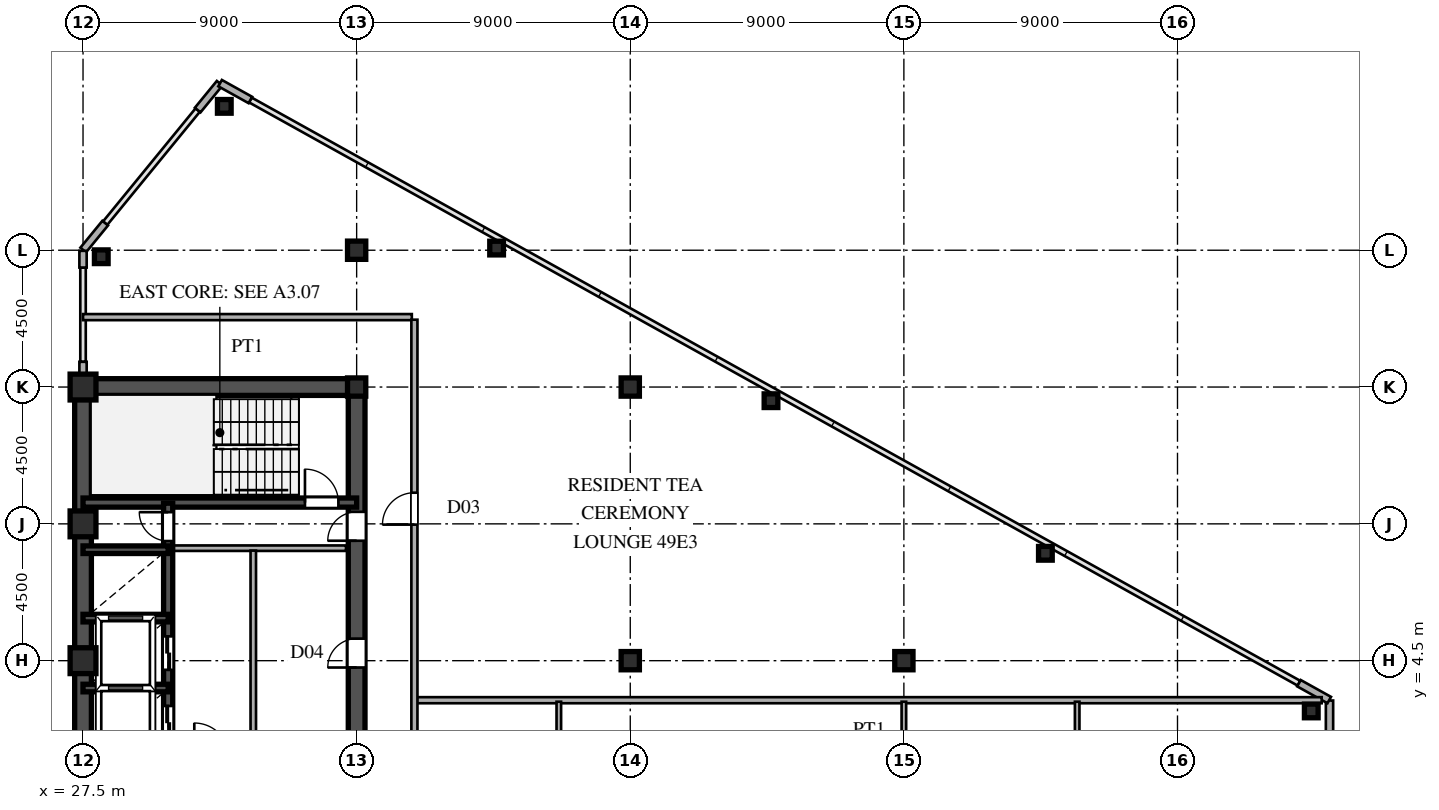
"""IFC4 building model, lengths in metres.
Left out: names, types, materials, properties, quantities, classifications, styles, units other than length and angle.
Written with IfcOpenShell. Run it as: python <this file> out.ifc"""

import sys

from ifc_helpers import new_model, si_unit, direction, frame, frame_2d, origin, origin_2d, place, context, subcontext, project, spatial, rectangle, hollow_rectangle, i_section, extrude, source, transform, mapped, element, fill, save


model = new_model("IFC4")
c1 = context("Model", 3, precision=1e-05, world=origin(), true_north=direction((0.0, 1.0)))
c2 = subcontext(c1, "Body", "Model", "MODEL_VIEW")
j1 = project(units=[si_unit("LENGTHUNIT", "METRE"), si_unit("PLANEANGLEUNIT", "RADIAN")], contexts=[c1])
p1 = place(None, origin())
s1 = spatial("IfcSite", under=j1, at=p1, CompositionType="ELEMENT")
p2 = place(p1, origin())
s2 = spatial("IfcBuilding", under=s1, at=p2, CompositionType="ELEMENT")
p3 = place(p2, frame((0.0, 0.0, 185.1)))
s3 = spatial("IfcBuildingStorey", under=s2, at=p3, CompositionType="ELEMENT", Elevation=185.1)
m1 = source(origin(), c2, "Body", "SweptSolid", [
    extrude(hollow_rectangle(XDim=0.85, YDim=0.85, WallThickness=0.036, at=origin_2d()), origin(), (0.0, 0.0, 1.0), 3.6),
])
for number, where, z_axis, x_axis in (
    (1, (27.5, 4.5, 0.0), (0.0, 0.0, 1.0), (1.0, 0.0, 0.0)),
    (2, (27.5, 9.0, 0.0), (0.0, 0.0, 1.0), (1.0, 0.0, 0.0)),
    (3, (27.5, 13.5, 0.0), (0.0, 0.0, 1.0), (1.0, 0.0, 0.0)),
):
    element("IfcColumn", number, at=place(p3, frame(where, z_axis=z_axis, x_axis=x_axis)), inside=s3, PredefinedType="COLUMN", context=c2, shape_type="MappedRepresentation", body=[
        mapped(m1, transform((0.0, 0.0, 0.0), scale=1.0)),
    ])
m2 = source(origin(), c2, "Body", "SweptSolid", [
    extrude(i_section(OverallWidth=0.6, OverallDepth=0.6, WebThickness=0.025, FlangeThickness=0.04, at=origin_2d()), origin(), (0.0, 0.0, 1.0), 3.6),
])
for number, where, z_axis, x_axis in (
    (4, (36.5, 13.5, 0.0), (0.0, 0.0, 1.0), (1.0, 0.0, 0.0)),
    (5, (36.5, 18.0, 0.0), (0.0, 0.0, 1.0), (1.0, 0.0, 0.0)),
    (6, (45.5, 4.5, 0.0), (0.0, 0.0, 1.0), (1.0, 0.0, 0.0)),
    (7, (45.5, 13.5, 0.0), (0.0, 0.0, 1.0), (1.0, 0.0, 0.0)),
    (8, (54.5, 4.5, 0.0), (0.0, 0.0, 1.0), (1.0, 0.0, 0.0)),
):
    element("IfcColumn", number, at=place(p3, frame(where, z_axis=z_axis, x_axis=x_axis)), inside=s3, PredefinedType="COLUMN", context=c2, shape_type="MappedRepresentation", body=[
        mapped(m2, transform((0.0, 0.0, 0.0), scale=1.0)),
    ])
m3 = source(origin(), c2, "Body", "SweptSolid", [
    extrude(hollow_rectangle(XDim=0.45, YDim=0.45, WallThickness=0.018, at=origin_2d()), origin(), (0.0, 0.0, 1.0), 3.6),
])
for number, where, z_axis, x_axis in (
    (9, (67.9, 2.847, 0.0), (0.0, 0.0, 1.0), (1.0, 0.0, 0.0)),
    (10, (32.147, 22.732, 0.0), (0.0, 0.0, 1.0), (1.0, 0.0, 0.0)),
    (11, (28.1, 17.786, 0.0), (0.0, 0.0, 1.0), (1.0, 0.0, 0.0)),
    (12, (41.104, 18.071, 0.0), (0.0, 0.0, 1.0), (1.0, 0.0, 0.0)),
    (13, (50.129, 13.051, 0.0), (0.0, 0.0, 1.0), (1.0, 0.0, 0.0)),
    (14, (59.155, 8.031, 0.0), (0.0, 0.0, 1.0), (1.0, 0.0, 0.0)),
):
    element("IfcColumn", number, at=place(p3, frame(where, z_axis=z_axis, x_axis=x_axis)), inside=s3, PredefinedType="COLUMN", context=c2, shape_type="MappedRepresentation", body=[
        mapped(m3, transform((0.0, 0.0, 0.0), scale=1.0)),
    ])
for number, where, z_axis, x_axis in (
    (15, (68.5, 2.05, 0.0), (0.0, 0.0, 1.0), (0.0, 1.0, 0.0)),
    (16, (68.491, 3.205, 0.0), (0.0, 0.0, 1.0), (-0.874, 0.486, 0.0)),
    (17, (33.005, 22.941, 0.0), (0.0, 0.0, 1.0), (-0.874, 0.486, 0.0)),
):
    element("IfcWall", number, at=place(p3, frame(where, z_axis=z_axis, x_axis=x_axis)), inside=s3, PredefinedType="SOLIDWALL", context=c2, shape_type="SweptSolid", body=[
        extrude(rectangle(XDim=1.14, YDim=0.24, at=frame_2d((0.57, 0.0))), origin(), (0.0, 0.0, 1.0), 3.38),
    ])
for number, where, z_axis, x_axis in (
    (18, (31.994, 23.492, 0.0), (0.0, 0.0, 1.0), (-0.633, -0.774, 0.0)),
    (19, (28.228, 18.89, 0.0), (0.0, 0.0, 1.0), (-0.633, -0.774, 0.0)),
):
    element("IfcWall", number, at=place(p3, frame(where, z_axis=z_axis, x_axis=x_axis)), inside=s3, PredefinedType="SOLIDWALL", context=c2, shape_type="SweptSolid", body=[
        extrude(rectangle(XDim=1.14, YDim=0.24, at=frame_2d((0.57, 0.0))), origin(), (0.0, 0.0, 1.0), 3.38),
    ])
p4 = place(p3, frame((27.5, 13.78, 0.0), z_axis=(0.0, 0.0, 1.0), x_axis=(0.0, 1.0, 0.0)))
e20 = element("IfcWall", 20, at=p4, inside=s3, PredefinedType="SOLIDWALL", context=c2, shape_type="SweptSolid", body=[
    extrude(rectangle(XDim=0.55, YDim=0.24, at=frame_2d((0.275, 0.0))), origin(), (0.0, 0.0, 1.0), 2.88),
])
p5 = place(p3, frame((27.5, 17.43, 0.0), z_axis=(0.0, 0.0, 1.0), x_axis=(0.0, 1.0, 0.0)))
e21 = element("IfcWall", 21, at=p5, inside=s3, PredefinedType="SOLIDWALL", context=c2, shape_type="SweptSolid", body=[
    extrude(rectangle(XDim=0.55, YDim=0.24, at=frame_2d((0.275, 0.0))), origin(), (0.0, 0.0, 1.0), 3.38),
])
p6 = place(p3, frame((27.5, 1.3, 0.0), z_axis=(0.0, 0.0, 1.0), x_axis=(0.0, 1.0, 0.0)))
e22 = element("IfcWall", 22, at=p6, inside=s3, PredefinedType="SHEAR", context=c2, shape_type="SweptSolid", body=[
    extrude(rectangle(XDim=12.2, YDim=0.55, at=frame_2d((6.1, 0.0))), origin(), (0.0, 0.0, 1.0), 3.38),
])
p7 = place(p3, frame((27.5, 13.5, 0.0), z_axis=(0.0, 0.0, 1.0), x_axis=(1.0, 0.0, 0.0)))
e23 = element("IfcWall", 23, at=p7, inside=s3, PredefinedType="SHEAR", context=c2, shape_type="SweptSolid", body=[
    extrude(rectangle(XDim=9.0, YDim=0.55, at=frame_2d((4.5, 0.0))), origin(), (0.0, 0.0, 1.0), 3.38),
])
p8 = place(p3, frame((36.5, 8.2, 0.0), z_axis=(0.0, 0.0, 1.0), x_axis=(0.0, 1.0, 0.0)))
e24 = element("IfcWall", 24, at=p8, inside=s3, PredefinedType="SHEAR", context=c2, shape_type="SweptSolid", body=[
    extrude(rectangle(XDim=5.45, YDim=0.55, at=frame_2d((2.725, 0.0))), origin(), (0.0, 0.0, 1.0), 3.38),
])
p9 = place(p8, frame((0.245, 0.0, 0.0)))
e25 = element("IfcOpeningElement", 25, at=p9, cuts=e24, PredefinedType="OPENING", context=c2, shape_type="SweptSolid", body=[
    extrude(rectangle(XDim=0.95, YDim=2.15, at=frame_2d((0.475, 1.075))), frame((0.0, 0.285, 0.0), z_axis=(0.0, -1.0, 0.0), x_axis=(1.0, 0.0, 0.0)), (0.0, 0.0, 1.0), 0.57),
])
p10 = place(p3, frame((36.5, 1.3, 0.0), z_axis=(0.0, 0.0, 1.0), x_axis=(0.0, 1.0, 0.0)))
e26 = element("IfcWall", 26, at=p10, inside=s3, PredefinedType="SHEAR", context=c2, shape_type="SweptSolid", body=[
    extrude(rectangle(XDim=6.9, YDim=0.55, at=frame_2d((3.45, 0.0))), origin(), (0.0, 0.0, 1.0), 3.38),
])
p11 = place(p10, frame((2.975, 0.0, 0.0)))
e27 = element("IfcOpeningElement", 27, at=p11, cuts=e26, PredefinedType="OPENING", context=c2, shape_type="SweptSolid", body=[
    extrude(rectangle(XDim=0.95, YDim=2.15, at=frame_2d((0.475, 1.075))), frame((0.0, 0.285, 0.0), z_axis=(0.0, -1.0, 0.0), x_axis=(1.0, 0.0, 0.0)), (0.0, 0.0, 1.0), 0.57),
])
p12 = place(p3, frame((27.5, 9.7, 0.0), z_axis=(0.0, 0.0, 1.0), x_axis=(1.0, 0.0, 0.0)))
e28 = element("IfcWall", 28, at=p12, inside=s3, PredefinedType="SHEAR", context=c2, shape_type="SweptSolid", body=[
    extrude(rectangle(XDim=9.0, YDim=0.3, at=frame_2d((4.5, 0.0))), origin(), (0.0, 0.0, 1.0), 3.38),
])
p13 = place(p12, frame((7.3, 0.0, 0.0)))
e29 = element("IfcOpeningElement", 29, at=p13, cuts=e28, PredefinedType="OPENING", context=c2, shape_type="SweptSolid", body=[
    extrude(rectangle(XDim=1.1, YDim=2.2, at=frame_2d((0.55, 1.1))), frame((0.0, 0.16, 0.0), z_axis=(0.0, -1.0, 0.0), x_axis=(1.0, 0.0, 0.0)), (0.0, 0.0, 1.0), 0.32),
])
for number, where, z_axis, x_axis in (
    (30, (27.5, 3.6, 0.0), (0.0, 0.0, 1.0), (1.0, 0.0, 0.0)),
    (31, (27.5, 5.9, 0.0), (0.0, 0.0, 1.0), (1.0, 0.0, 0.0)),
    (32, (27.5, 8.15, 0.0), (0.0, 0.0, 1.0), (1.0, 0.0, 0.0)),
):
    element("IfcWall", number, at=place(p3, frame(where, z_axis=z_axis, x_axis=x_axis)), inside=s3, PredefinedType="SHEAR", context=c2, shape_type="SweptSolid", body=[
        extrude(rectangle(XDim=2.8, YDim=0.25, at=frame_2d((1.4, 0.0))), origin(), (0.0, 0.0, 1.0), 3.38),
    ])
p14 = place(p3, frame((30.3, 1.32, 0.0), z_axis=(0.0, 0.0, 1.0), x_axis=(0.0, 1.0, 0.0)))
e33 = element("IfcWall", 33, at=p14, inside=s3, PredefinedType="SHEAR", context=c2, shape_type="SweptSolid", body=[
    extrude(rectangle(XDim=2.28, YDim=0.3, at=frame_2d((1.14, 0.0))), origin(), (0.0, 0.0, 1.0), 3.38),
])
p15 = place(p14, frame((0.59, 0.0, 0.0)))
e34 = element("IfcOpeningElement", 34, at=p15, cuts=e33, PredefinedType="OPENING", context=c2, shape_type="SweptSolid", body=[
    extrude(rectangle(XDim=1.1, YDim=2.2, at=frame_2d((0.55, 1.1))), frame((0.0, 0.16, 0.0), z_axis=(0.0, -1.0, 0.0), x_axis=(1.0, 0.0, 0.0)), (0.0, 0.0, 1.0), 0.32),
])
p16 = place(p3, frame((30.3, 3.6, 0.0), z_axis=(0.0, 0.0, 1.0), x_axis=(0.0, 1.0, 0.0)))
e35 = element("IfcWall", 35, at=p16, inside=s3, PredefinedType="SHEAR", context=c2, shape_type="SweptSolid", body=[
    extrude(rectangle(XDim=2.3, YDim=0.3, at=frame_2d((1.15, 0.0))), origin(), (0.0, 0.0, 1.0), 3.38),
])
p17 = place(p16, frame((0.6, 0.0, 0.0)))
e36 = element("IfcOpeningElement", 36, at=p17, cuts=e35, PredefinedType="OPENING", context=c2, shape_type="SweptSolid", body=[
    extrude(rectangle(XDim=1.1, YDim=2.2, at=frame_2d((0.55, 1.1))), frame((0.0, 0.16, 0.0), z_axis=(0.0, -1.0, 0.0), x_axis=(1.0, 0.0, 0.0)), (0.0, 0.0, 1.0), 0.32),
])
p18 = place(p3, frame((30.3, 5.9, 0.0), z_axis=(0.0, 0.0, 1.0), x_axis=(0.0, 1.0, 0.0)))
e37 = element("IfcWall", 37, at=p18, inside=s3, PredefinedType="SHEAR", context=c2, shape_type="SweptSolid", body=[
    extrude(rectangle(XDim=2.25, YDim=0.3, at=frame_2d((1.125, 0.0))), origin(), (0.0, 0.0, 1.0), 3.38),
])
p19 = place(p3, frame((30.3, 8.15, 0.0), z_axis=(0.0, 0.0, 1.0), x_axis=(0.0, 1.0, 0.0)))
e38 = element("IfcWall", 38, at=p19, inside=s3, PredefinedType="SHEAR", context=c2, shape_type="SweptSolid", body=[
    extrude(rectangle(XDim=1.53, YDim=0.3, at=frame_2d((0.765, 0.0))), origin(), (0.0, 0.0, 1.0), 3.38),
])
p20 = place(p19, frame((0.285, 0.0, 0.0)))
e39 = element("IfcOpeningElement", 39, at=p20, cuts=e38, PredefinedType="OPENING", context=c2, shape_type="SweptSolid", body=[
    extrude(rectangle(XDim=0.95, YDim=2.15, at=frame_2d((0.475, 1.075))), frame((0.0, 0.16, 0.0), z_axis=(0.0, -1.0, 0.0), x_axis=(1.0, 0.0, 0.0)), (0.0, 0.0, 1.0), 0.32),
])
p21 = place(p3, frame((30.45, 8.2, 0.0), z_axis=(0.0, 0.0, 1.0), x_axis=(1.0, 0.0, 0.0)))
e40 = element("IfcWall", 40, at=p21, inside=s3, PredefinedType="PARTITIONING", context=c2, shape_type="SweptSolid", body=[
    extrude(rectangle(XDim=5.7, YDim=0.18, at=frame_2d((2.85, 0.0))), origin(), (0.0, 0.0, 1.0), 3.38),
])
p22 = place(p3, frame((33.1, 1.38, 0.0), z_axis=(0.0, 0.0, 1.0), x_axis=(0.0, 1.0, 0.0)))
e41 = element("IfcWall", 41, at=p22, inside=s3, PredefinedType="PARTITIONING", context=c2, shape_type="SweptSolid", body=[
    extrude(rectangle(XDim=6.74, YDim=0.18, at=frame_2d((3.37, 0.0))), origin(), (0.0, 0.0, 1.0), 3.38),
])
p23 = place(p3, frame((38.48, 3.2, 0.0), z_axis=(0.0, 0.0, 1.0), x_axis=(1.0, 0.0, 0.0)))
e42 = element("IfcWall", 42, at=p23, inside=s3, PredefinedType="PARTITIONING", context=c2, shape_type="SweptSolid", body=[
    extrude(rectangle(XDim=29.763, YDim=0.2, at=frame_2d((14.881, 0.0))), origin(), (0.0, 0.0, 1.0), 3.38),
])
p24 = place(p3, frame((27.5, 15.8, 0.0), z_axis=(0.0, 0.0, 1.0), x_axis=(1.0, 0.0, 0.0)))
e43 = element("IfcWall", 43, at=p24, inside=s3, PredefinedType="PARTITIONING", context=c2, shape_type="SweptSolid", body=[
    extrude(rectangle(XDim=10.815, YDim=0.2, at=frame_2d((5.407, 0.0))), origin(), (0.0, 0.0, 1.0), 3.38),
])
p25 = place(p3, frame((38.4, -15.715, 0.0), z_axis=(0.0, 0.0, 1.0), x_axis=(0.0, 1.0, 0.0)))
e44 = element("IfcWall", 44, at=p25, inside=s3, PredefinedType="PARTITIONING", context=c2, shape_type="SweptSolid", body=[
    extrude(rectangle(XDim=31.43, YDim=0.2, at=frame_2d((15.715, 0.0))), origin(), (0.0, 0.0, 1.0), 3.38),
])
p26 = place(p25, frame((2.39, 0.0, 0.0)))
e45 = element("IfcOpeningElement", 45, at=p26, cuts=e44, PredefinedType="OPENING", context=c2, shape_type="SweptSolid", body=[
    extrude(rectangle(XDim=1.05, YDim=2.25, at=frame_2d((0.525, 1.125))), frame((0.0, 0.11, 0.0), z_axis=(0.0, -1.0, 0.0), x_axis=(1.0, 0.0, 0.0)), (0.0, 0.0, 1.0), 0.22),
])
p27 = place(p25, frame((11.695, 0.0, 0.0)))
e46 = element("IfcOpeningElement", 46, at=p27, cuts=e44, PredefinedType="OPENING", context=c2, shape_type="SweptSolid", body=[
    extrude(rectangle(XDim=1.05, YDim=2.25, at=frame_2d((0.525, 1.125))), frame((0.0, 0.11, 0.0), z_axis=(0.0, -1.0, 0.0), x_axis=(1.0, 0.0, 0.0)), (0.0, 0.0, 1.0), 0.22),
])
p28 = place(p25, frame((24.69, 0.0, 0.0)))
e47 = element("IfcOpeningElement", 47, at=p28, cuts=e44, PredefinedType="OPENING", context=c2, shape_type="SweptSolid", body=[
    extrude(rectangle(XDim=1.05, YDim=2.25, at=frame_2d((0.525, 1.125))), frame((0.0, 0.11, 0.0), z_axis=(0.0, -1.0, 0.0), x_axis=(1.0, 0.0, 0.0)), (0.0, 0.0, 1.0), 0.22),
])
p29 = place(p3, frame((43.15, -0.648, 0.0), z_axis=(0.0, 0.0, 1.0), x_axis=(0.0, 1.0, 0.0)))
e48 = element("IfcWall", 48, at=p29, inside=s3, PredefinedType="PARTITIONING", context=c2, shape_type="SweptSolid", body=[
    extrude(rectangle(XDim=3.798, YDim=0.15, at=frame_2d((1.899, 0.0))), origin(), (0.0, 0.0, 1.0), 3.38),
])
p30 = place(p3, frame((54.5, -9.75, 0.0), z_axis=(0.0, 0.0, 1.0), x_axis=(0.0, 1.0, 0.0)))
e49 = element("IfcWall", 49, at=p30, inside=s3, PredefinedType="PARTITIONING", context=c2, shape_type="SweptSolid", body=[
    extrude(rectangle(XDim=12.9, YDim=0.15, at=frame_2d((6.45, 0.0))), origin(), (0.0, 0.0, 1.0), 2.78),
])
p31 = place(p30, frame((5.975, 0.0, 0.0)))
e50 = element("IfcOpeningElement", 50, at=p31, cuts=e49, PredefinedType="OPENING", context=c2, shape_type="SweptSolid", body=[
    extrude(rectangle(XDim=0.95, YDim=2.15, at=frame_2d((0.475, 1.075))), frame((0.0, 0.085, 0.0), z_axis=(0.0, -1.0, 0.0), x_axis=(1.0, 0.0, 0.0)), (0.0, 0.0, 1.0), 0.17),
])
p32 = place(p3, frame((60.2, -5.417, 0.0), z_axis=(0.0, 0.0, 1.0), x_axis=(0.0, 1.0, 0.0)))
e51 = element("IfcWall", 51, at=p32, inside=s3, PredefinedType="PARTITIONING", context=c2, shape_type="SweptSolid", body=[
    extrude(rectangle(XDim=8.567, YDim=0.15, at=frame_2d((4.283, 0.0))), origin(), (0.0, 0.0, 1.0), 3.38),
])
p33 = place(p32, frame((1.642, 0.0, 0.0)))
e52 = element("IfcOpeningElement", 52, at=p33, cuts=e51, PredefinedType="OPENING", context=c2, shape_type="SweptSolid", body=[
    extrude(rectangle(XDim=0.95, YDim=2.15, at=frame_2d((0.475, 1.075))), frame((0.0, 0.085, 0.0), z_axis=(0.0, -1.0, 0.0), x_axis=(1.0, 0.0, 0.0)), (0.0, 0.0, 1.0), 0.17),
])
m4 = source(origin(), c2, "Body", "SweptSolid", [
    extrude(rectangle(XDim=0.95, YDim=2.15, at=frame_2d((0.475, 1.075))), frame((0.0, 0.025, 0.0), z_axis=(0.0, -1.0, 0.0), x_axis=(1.0, 0.0, 0.0)), (0.0, 0.0, 1.0), 0.05),
])
p34 = place(p9, origin())
e53 = element("IfcDoor", 53, at=p34, inside=s3, OperationType="SINGLE_SWING_LEFT", PredefinedType="DOOR", context=c2, shape_type="MappedRepresentation", body=[
    mapped(m4, transform((0.0, 0.0, 0.0), scale=1.0)),
])
fill(e25, e53)
p35 = place(p11, origin())
e54 = element("IfcDoor", 54, at=p35, inside=s3, OperationType="SINGLE_SWING_LEFT", PredefinedType="DOOR", context=c2, shape_type="MappedRepresentation", body=[
    mapped(m4, transform((0.0, 0.0, 0.0), scale=1.0)),
])
fill(e27, e54)
m5 = source(origin(), c2, "Body", "SweptSolid", [
    extrude(rectangle(XDim=1.1, YDim=2.2, at=frame_2d((0.55, 1.1))), frame((0.0, 0.025, 0.0), z_axis=(0.0, -1.0, 0.0), x_axis=(1.0, 0.0, 0.0)), (0.0, 0.0, 1.0), 0.05),
])
p36 = place(p13, origin())
e55 = element("IfcDoor", 55, at=p36, inside=s3, OperationType="SINGLE_SWING_LEFT", PredefinedType="DOOR", context=c2, shape_type="MappedRepresentation", body=[
    mapped(m5, transform((0.0, 0.0, 0.0), scale=1.0)),
])
fill(e29, e55)
m6 = source(origin(), c2, "Body", "SweptSolid", [
    extrude(rectangle(XDim=1.1, YDim=2.2, at=frame_2d((0.55, 1.1))), frame((0.0, 0.025, 0.0), z_axis=(0.0, -1.0, 0.0), x_axis=(1.0, 0.0, 0.0)), (0.0, 0.0, 1.0), 0.05),
])
p37 = place(p15, origin())
e56 = element("IfcDoor", 56, at=p37, inside=s3, OperationType="DOUBLE_DOOR_SLIDING", PredefinedType="DOOR", context=c2, shape_type="MappedRepresentation", body=[
    mapped(m6, transform((0.0, 0.0, 0.0), scale=1.0)),
])
fill(e34, e56)
p38 = place(p17, origin())
e57 = element("IfcDoor", 57, at=p38, inside=s3, OperationType="DOUBLE_DOOR_SLIDING", PredefinedType="DOOR", context=c2, shape_type="MappedRepresentation", body=[
    mapped(m6, transform((0.0, 0.0, 0.0), scale=1.0)),
])
fill(e36, e57)
p39 = place(p20, origin())
e58 = element("IfcDoor", 58, at=p39, inside=s3, OperationType="SINGLE_SWING_RIGHT", PredefinedType="DOOR", context=c2, shape_type="MappedRepresentation", body=[
    mapped(m4, transform((0.0, 0.0, 0.0), scale=1.0)),
])
fill(e39, e58)
m7 = source(origin(), c2, "Body", "SweptSolid", [
    extrude(rectangle(XDim=1.05, YDim=2.25, at=frame_2d((0.525, 1.125))), frame((0.0, 0.025, 0.0), z_axis=(0.0, -1.0, 0.0), x_axis=(1.0, 0.0, 0.0)), (0.0, 0.0, 1.0), 0.05),
])
p40 = place(p28, origin())
e59 = element("IfcDoor", 59, at=p40, inside=s3, OperationType="SINGLE_SWING_LEFT", PredefinedType="DOOR", context=c2, shape_type="MappedRepresentation", body=[
    mapped(m7, transform((0.0, 0.0, 0.0), scale=1.0)),
])
fill(e47, e59)
save(model, sys.argv[1])
